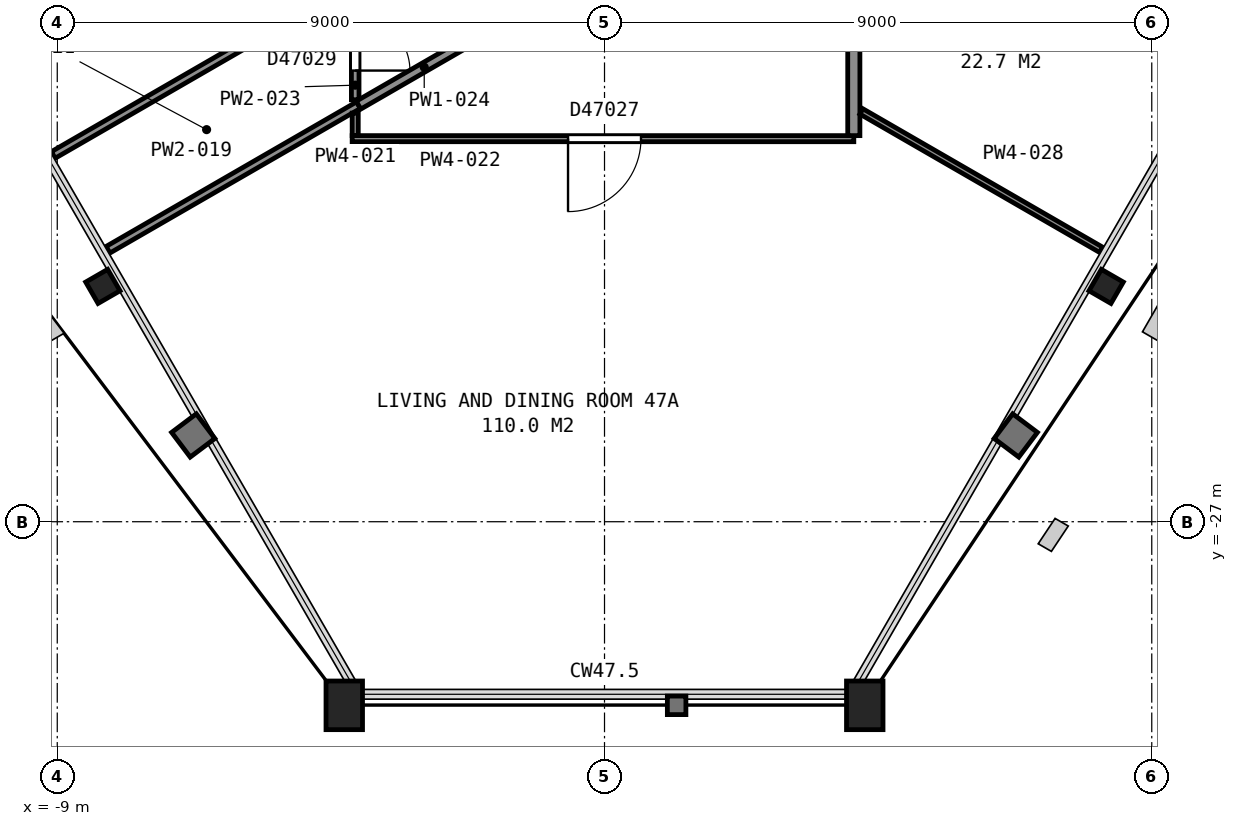
"""IFC4 building model, lengths in metres.
Left out: names, types, materials, properties, quantities, classifications, styles, units other than length and angle.
Written with IfcOpenShell. Run it as: python <this file> out.ifc"""

import sys

from ifc_helpers import new_model, si_unit, direction, frame, frame_2d, origin, origin_2d, place, context, subcontext, project, spatial, rectangle, hollow_rectangle, i_section, extrude, element, fill, save


model = new_model("IFC4")
c1 = context("Model", 3, precision=1e-05, world=origin(), true_north=direction((0.0, 1.0)))
c2 = subcontext(c1, "Body", "Model", "MODEL_VIEW")
j1 = project(units=[si_unit("LENGTHUNIT", "METRE"), si_unit("PLANEANGLEUNIT", "RADIAN")], contexts=[c1])
p1 = place(None, origin())
s1 = spatial("IfcSite", under=j1, at=p1, CompositionType="ELEMENT")
p2 = place(p1, origin())
s2 = spatial("IfcBuilding", under=s1, at=p2, CompositionType="ELEMENT")
p3 = place(p2, frame((0.0, 0.0, 189.5)))
s3 = spatial("IfcBuildingStorey", under=s2, at=p3, CompositionType="ELEMENT", Elevation=189.5)
p4 = place(p3, frame((-8.25, -23.13, 0.04), z_axis=(0.0, 0.0, 1.0), x_axis=(-0.5, 0.866025403784, 0.0)))
e1 = element("IfcColumn", 1, at=p4, inside=s3, PredefinedType="COLUMN", context=c2, shape_type="SweptSolid", body=[
    extrude(i_section(OverallWidth=0.406, OverallDepth=0.417, WebThickness=0.03, FlangeThickness=0.048, FilletRadius=0.015, at=origin_2d()), origin(), (0.0, 0.0, 1.0), 3.66),
])
for number, where, z_axis, x_axis in (
    (2, (-4.28, -30.02, 0.065), (0.0, 0.0, 1.0), (-1.0, 0.0, 0.0)),
    (3, (4.28, -30.02, 0.065), (0.0, 0.0, 1.0), (-1.0, 0.0, 0.0)),
):
    element("IfcColumn", number, at=place(p3, frame(where, z_axis=z_axis, x_axis=x_axis)), inside=s3, PredefinedType="COLUMN", context=c2, shape_type="SweptSolid", body=[
        extrude(hollow_rectangle(XDim=0.6, YDim=0.8, WallThickness=0.05, at=origin_2d()), origin(), (0.0, 0.0, 1.0), 3.635),
    ])
p5 = place(p3, frame((8.25, -23.13, 0.04), z_axis=(0.0, 0.0, 1.0), x_axis=(-0.5, -0.866025403784, 0.0)))
e4 = element("IfcColumn", 4, at=p5, inside=s3, PredefinedType="COLUMN", context=c2, shape_type="SweptSolid", body=[
    extrude(i_section(OverallWidth=0.406, OverallDepth=0.417, WebThickness=0.03, FlangeThickness=0.048, FilletRadius=0.015, at=origin_2d()), origin(), (0.0, 0.0, 1.0), 3.66),
])
p6 = place(p3, frame((-9.066, -20.968, 0.0), z_axis=(0.0, 0.0, 1.0), x_axis=(0.866023559602, 0.500003194204, 0.0)))
e5 = element("IfcWall", 5, at=p6, inside=s3, PredefinedType="PARTITIONING", context=c2, shape_type="SweptSolid", body=[
    extrude(rectangle(XDim=5.796, YDim=0.125, at=frame_2d((2.898, 0.0))), origin(), (0.0, 0.0, 1.0), 2.713),
])
p7 = place(p3, frame((-8.166, -22.527, 0.0), z_axis=(0.0, 0.0, 1.0), x_axis=(0.866042865666, 0.499969753915, 0.0)))
e6 = element("IfcWall", 6, at=p7, inside=s3, PredefinedType="PARTITIONING", context=c2, shape_type="SweptSolid", body=[
    extrude(rectangle(XDim=4.757, YDim=0.125, at=frame_2d((2.378, 0.0))), origin(), (0.0, 0.0, 1.0), 2.713),
])
p8 = place(p3, frame((-4.1, -20.65, 0.0), z_axis=(0.0, 0.0, 1.0), x_axis=(0.0, 1.0, 0.0)))
e7 = element("IfcWall", 7, at=p8, inside=s3, PredefinedType="PARTITIONING", context=c2, shape_type="SweptSolid", body=[
    extrude(rectangle(XDim=0.37, YDim=0.1, at=frame_2d((0.185, 0.0))), origin(), (0.0, 0.0, 1.0), 2.713),
])
p9 = place(p3, frame((4.1, -20.7, 0.0), z_axis=(0.0, 0.0, 1.0), x_axis=(-1.0, 0.0, 0.0)))
e8 = element("IfcWall", 8, at=p9, inside=s3, PredefinedType="PARTITIONING", context=c2, shape_type="SweptSolid", body=[
    extrude(rectangle(XDim=8.25, YDim=0.1, at=frame_2d((4.125, 0.0))), origin(), (0.0, 0.0, 1.0), 2.713),
])
p10 = place(p9, frame((3.5, 0.0, 0.0)))
e9 = element("IfcOpeningElement", 9, at=p10, cuts=e8, PredefinedType="OPENING", context=c2, shape_type="SweptSolid", body=[
    extrude(rectangle(XDim=1.2, YDim=2.1, at=frame_2d((0.6, 1.05))), frame((0.0, 0.06, 0.0), z_axis=(0.0, -1.0, 0.0), x_axis=(1.0, 0.0, 0.0)), (0.0, 0.0, 1.0), 0.12),
])
p11 = place(p3, frame((-4.1, -18.206, 0.0), z_axis=(0.0, 0.0, 1.0), x_axis=(0.0, -1.0, 0.0)))
e10 = element("IfcWall", 10, at=p11, inside=s3, PredefinedType="PARTITIONING", context=c2, shape_type="SweptSolid", body=[
    extrude(rectangle(XDim=1.854, YDim=0.125, at=frame_2d((0.927, 0.0))), origin(), (0.0, 0.0, 1.0), 2.713),
])
p12 = place(p11, frame((0.474, 0.0, 0.0)))
e11 = element("IfcOpeningElement", 11, at=p12, cuts=e10, PredefinedType="OPENING", context=c2, shape_type="SweptSolid", body=[
    extrude(rectangle(XDim=0.9, YDim=2.1, at=frame_2d((0.45, 1.05))), frame((0.0, 0.073, 0.0), z_axis=(0.0, -1.0, 0.0), x_axis=(1.0, 0.0, 0.0)), (0.0, 0.0, 1.0), 0.145),
])
p13 = place(p3, frame((-4.046, -20.149, 0.0), z_axis=(0.0, 0.0, 1.0), x_axis=(0.865916841101, 0.500187988959, 0.0)))
e12 = element("IfcWall", 12, at=p13, inside=s3, PredefinedType="PARTITIONING", context=c2, shape_type="SweptSolid", body=[
    extrude(rectangle(XDim=2.497, YDim=0.15, at=frame_2d((1.248, 0.0))), origin(), (0.0, 0.0, 1.0), 2.713),
])
p14 = place(p3, frame((4.1, -12.402, 0.0), z_axis=(0.0, 0.0, 1.0), x_axis=(0.0, -1.0, 0.0)))
e13 = element("IfcWall", 13, at=p14, inside=s3, PredefinedType="PARTITIONING", context=c2, shape_type="SweptSolid", body=[
    extrude(rectangle(XDim=8.248, YDim=0.2, at=frame_2d((4.124, 0.0))), origin(), (0.0, 0.0, 1.0), 2.713),
])
p15 = place(p14, frame((4.928, 0.0, 0.0)))
e14 = element("IfcOpeningElement", 14, at=p15, cuts=e13, PredefinedType="OPENING", context=c2, shape_type="SweptSolid", body=[
    extrude(rectangle(XDim=0.9, YDim=2.1, at=frame_2d((0.45, 1.05))), frame((0.0, 0.11, 0.0), z_axis=(0.0, -1.0, 0.0), x_axis=(1.0, 0.0, 0.0)), (0.0, 0.0, 1.0), 0.22),
])
p16 = place(p3, frame((4.225, -20.252, 0.0), z_axis=(0.0, 0.0, 1.0), x_axis=(0.866048884701, -0.499959327653, 0.0)))
e15 = element("IfcWall", 15, at=p16, inside=s3, PredefinedType="PARTITIONING", context=c2, shape_type="SweptSolid", body=[
    extrude(rectangle(XDim=4.55, YDim=0.1, at=frame_2d((2.275, 0.0))), origin(), (0.0, 0.0, 1.0), 2.713),
])
p17 = place(p10, origin())
e16 = element("IfcDoor", 16, at=p17, inside=s3, OperationType="SINGLE_SWING_RIGHT", PredefinedType="DOOR", context=c2, shape_type="SweptSolid", body=[
    extrude(rectangle(XDim=1.2, YDim=2.1, at=frame_2d((0.6, 1.05))), frame((0.0, 0.025, 0.0), z_axis=(0.0, -1.0, 0.0), x_axis=(1.0, 0.0, 0.0)), (0.0, 0.0, 1.0), 0.05),
])
fill(e9, e16)
p18 = place(p12, origin())
e17 = element("IfcDoor", 17, at=p18, inside=s3, OperationType="SINGLE_SWING_RIGHT", PredefinedType="DOOR", context=c2, shape_type="SweptSolid", body=[
    extrude(rectangle(XDim=0.9, YDim=2.1, at=frame_2d((0.45, 1.05))), frame((0.0, 0.025, 0.0), z_axis=(0.0, -1.0, 0.0), x_axis=(1.0, 0.0, 0.0)), (0.0, 0.0, 1.0), 0.05),
])
fill(e11, e17)
save(model, sys.argv[1])
